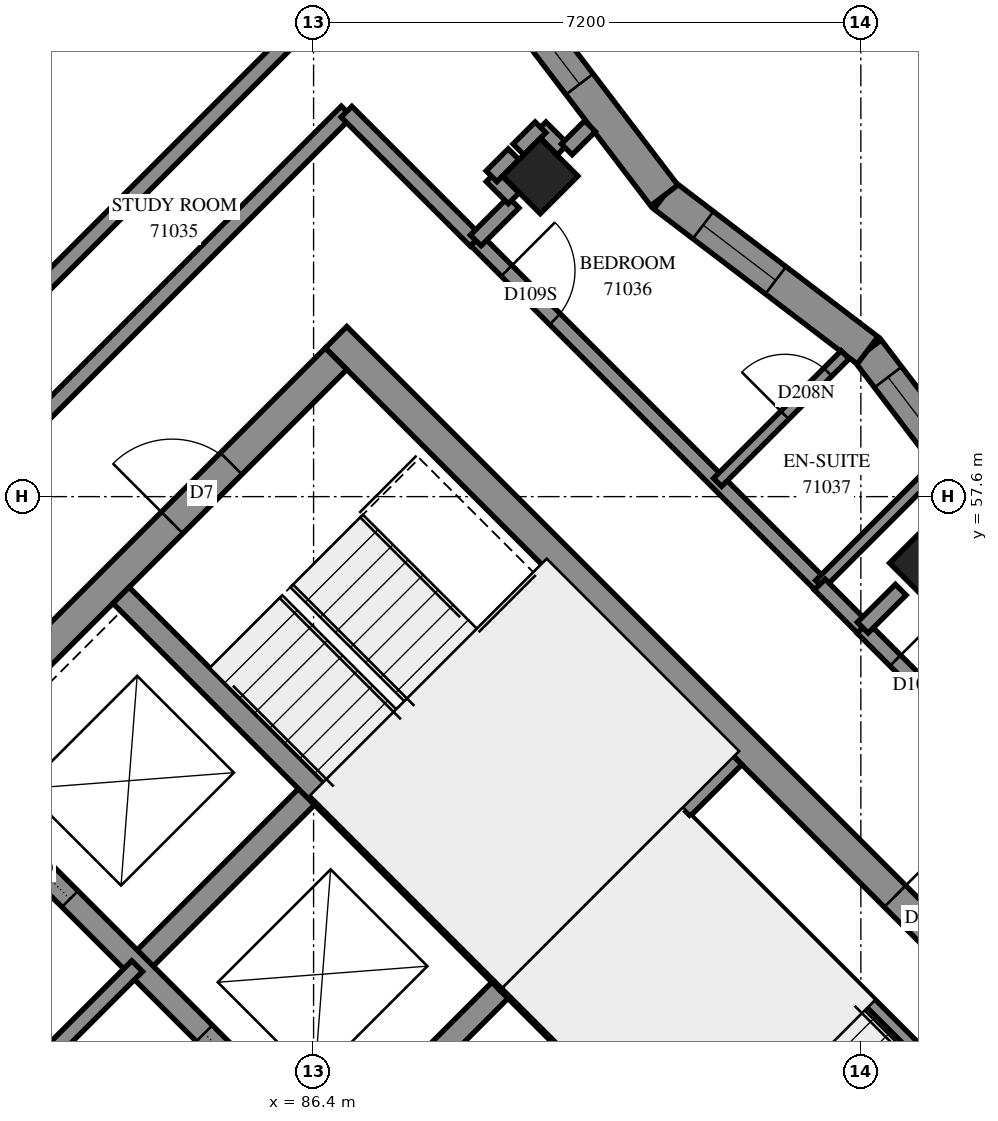
"""IFC4 building model, lengths in metres.
Left out: names, types, materials, properties, quantities, classifications, styles, units other than length and angle.
Written with IfcOpenShell. Run it as: python <this file> out.ifc"""

import sys

from ifc_helpers import new_model, si_unit, direction, frame, frame_2d, origin, origin_2d, place, context, subcontext, project, spatial, polyline, rectangle, outline, extrude, element, fill, save


model = new_model("IFC4")
c1 = context("Model", 3, precision=1e-05, world=origin(), true_north=direction((0.0, 1.0)))
c2 = subcontext(c1, "Body", "Model", "MODEL_VIEW")
j1 = project(units=[si_unit("LENGTHUNIT", "METRE"), si_unit("PLANEANGLEUNIT", "RADIAN")], contexts=[c1])
p1 = place(None, origin())
s1 = spatial("IfcSite", under=j1, at=p1, CompositionType="ELEMENT")
p2 = place(p1, origin())
s2 = spatial("IfcBuilding", under=s1, at=p2, CompositionType="ELEMENT")
p3 = place(p2, frame((0.0, 0.0, 260.8)))
s3 = spatial("IfcBuildingStorey", under=s2, at=p3, CompositionType="ELEMENT", Elevation=260.8)
for number, where, z_axis, x_axis in (
    (1, (89.382, 61.818, 0.0), (0.0, 0.0, 1.0), (0.707, -0.707, 0.0)),
    (2, (94.474, 56.727, 0.0), (0.0, 0.0, 1.0), (0.707, -0.707, 0.0)),
):
    element("IfcColumn", number, at=place(p3, frame(where, z_axis=z_axis, x_axis=x_axis)), inside=s3, PredefinedType="COLUMN", context=c2, shape_type="SweptSolid", body=[
        extrude(rectangle(XDim=0.7, YDim=0.7, at=origin_2d()), origin(), (0.0, 0.0, 1.0), 3.1),
    ])
p4 = place(p3, frame((86.695, 59.696, -0.3), z_axis=(0.0, 0.0, 1.0), x_axis=(0.7071100706, -0.7071034917, 0.0)))
e3 = element("IfcWall", 3, at=p4, inside=s3, PredefinedType="SHEAR", context=c2, shape_type="SweptSolid", body=[
    extrude(rectangle(XDim=15.2, YDim=0.4, at=frame_2d((7.6, 0.0))), origin(), (0.0, 0.0, 1.0), 2.7),
])
p5 = place(p4, frame((10.4, 0.0, 0.3)))
e4 = element("IfcOpeningElement", 4, at=p5, cuts=e3, PredefinedType="OPENING", context=c2, shape_type="SweptSolid", body=[
    extrude(rectangle(XDim=0.8, YDim=2.1, at=frame_2d((0.4, 1.05))), frame((0.0, 0.21, 0.0), z_axis=(0.0, -1.0, 0.0), x_axis=(1.0, 0.0, 0.0)), (0.0, 0.0, 1.0), 0.42),
])
p6 = place(p3, frame((76.513, 49.231, -0.3), z_axis=(0.0, 0.0, 1.0), x_axis=(0.7071067812, 0.7071067812, 0.0)))
e5 = element("IfcWall", 5, at=p6, inside=s3, PredefinedType="SHEAR", context=c2, shape_type="SweptSolid", body=[
    extrude(rectangle(XDim=14.4, YDim=0.4, at=frame_2d((7.2, 0.0))), origin(), (0.0, 0.0, 1.0), 2.7),
])
p7 = place(p6, frame((4.55, 0.0, 0.3)))
e6 = element("IfcOpeningElement", 6, at=p7, cuts=e5, PredefinedType="OPENING", context=c2, shape_type="SweptSolid", body=[
    extrude(rectangle(XDim=1.1, YDim=2.1, at=frame_2d((0.55, 1.05))), frame((0.0, 0.21, 0.0), z_axis=(0.0, -1.0, 0.0), x_axis=(1.0, 0.0, 0.0)), (0.0, 0.0, 1.0), 0.42),
])
p8 = place(p6, frame((11.35, 0.0, 0.3)))
e7 = element("IfcOpeningElement", 7, at=p8, cuts=e5, PredefinedType="OPENING", context=c2, shape_type="SweptSolid", body=[
    extrude(rectangle(XDim=1.1, YDim=2.1, at=frame_2d((0.55, 1.05))), frame((0.0, 0.21, 0.0), z_axis=(0.0, -1.0, 0.0), x_axis=(1.0, 0.0, 0.0)), (0.0, 0.0, 1.0), 0.42),
])
p9 = place(p3, frame((84.079, 51.423, 0.0), z_axis=(0.0, 0.0, 1.0), x_axis=(0.7071219326, 0.7070916295, 0.0)))
e8 = element("IfcWall", 8, at=p9, inside=s3, PredefinedType="SOLIDWALL", context=c2, shape_type="SweptSolid", body=[
    extrude(rectangle(XDim=3.3, YDim=0.3, at=frame_2d((1.65, 0.0))), origin(), (0.0, 0.0, 1.0), 3.1),
])
p10 = place(p3, frame((86.625, 48.878, 0.0), z_axis=(0.0, 0.0, 1.0), x_axis=(0.7071067812, 0.7071067812, 0.0)))
e9 = element("IfcWall", 9, at=p10, inside=s3, PredefinedType="SOLIDWALL", context=c2, shape_type="SweptSolid", body=[
    extrude(rectangle(XDim=3.3, YDim=0.3, at=frame_2d((1.65, 0.0))), origin(), (0.0, 0.0, 1.0), 3.1),
])
p11 = place(p3, frame((78.988, 51.423, 0.0), z_axis=(0.0, 0.0, 1.0), x_axis=(0.7071067812, -0.7071067812, 0.0)))
e10 = element("IfcWall", 10, at=p11, inside=s3, PredefinedType="SOLIDWALL", context=c2, shape_type="SweptSolid", body=[
    extrude(rectangle(XDim=14.4, YDim=0.3, at=frame_2d((7.2, 0.0))), origin(), (0.0, 0.0, 1.0), 3.1),
])
p12 = place(p11, frame((1.35, 0.0, 0.0)))
e11 = element("IfcOpeningElement", 11, at=p12, cuts=e10, PredefinedType="OPENING", context=c2, shape_type="SweptSolid", body=[
    extrude(rectangle(XDim=0.9, YDim=2.1, at=frame_2d((0.45, 1.05))), frame((0.0, 0.16, 0.0), z_axis=(0.0, -1.0, 0.0), x_axis=(1.0, 0.0, 0.0)), (0.0, 0.0, 1.0), 0.32),
])
p13 = place(p11, frame((4.95, 0.0, 0.0)))
e12 = element("IfcOpeningElement", 12, at=p13, cuts=e10, PredefinedType="OPENING", context=c2, shape_type="SweptSolid", body=[
    extrude(rectangle(XDim=0.9, YDim=2.1, at=frame_2d((0.45, 1.05))), frame((0.0, 0.16, 0.0), z_axis=(0.0, -1.0, 0.0), x_axis=(1.0, 0.0, 0.0)), (0.0, 0.0, 1.0), 0.32),
])
p14 = place(p11, frame((8.55, 0.0, 0.0)))
e13 = element("IfcOpeningElement", 13, at=p14, cuts=e10, PredefinedType="OPENING", context=c2, shape_type="SweptSolid", body=[
    extrude(rectangle(XDim=0.9, YDim=2.1, at=frame_2d((0.45, 1.05))), frame((0.0, 0.16, 0.0), z_axis=(0.0, -1.0, 0.0), x_axis=(1.0, 0.0, 0.0)), (0.0, 0.0, 1.0), 0.32),
])
p15 = place(p11, frame((12.05, 0.0, 0.0)))
e14 = element("IfcOpeningElement", 14, at=p15, cuts=e10, PredefinedType="OPENING", context=c2, shape_type="SweptSolid", body=[
    extrude(rectangle(XDim=1.1, YDim=2.1, at=frame_2d((0.55, 1.05))), frame((0.0, 0.16, 0.0), z_axis=(0.0, -1.0, 0.0), x_axis=(1.0, 0.0, 0.0)), (0.0, 0.0, 1.0), 0.32),
])
p16 = place(p3, frame((81.534, 53.969, 0.0), z_axis=(0.0, 0.0, 1.0), x_axis=(0.707103309, -0.7071102534, 0.0)))
e15 = element("IfcWall", 15, at=p16, inside=s3, PredefinedType="SOLIDWALL", context=c2, shape_type="SweptSolid", body=[
    extrude(rectangle(XDim=14.4, YDim=0.3, at=frame_2d((7.2, 0.0))), origin(), (0.0, 0.0, 1.0), 3.1),
])
p17 = place(p16, frame((8.55, 0.0, 0.0)))
e16 = element("IfcOpeningElement", 16, at=p17, cuts=e15, PredefinedType="OPENING", context=c2, shape_type="SweptSolid", body=[
    extrude(rectangle(XDim=0.9, YDim=2.1, at=frame_2d((0.45, 1.05))), frame((0.0, 0.16, 0.0), z_axis=(0.0, -1.0, 0.0), x_axis=(1.0, 0.0, 0.0)), (0.0, 0.0, 1.0), 0.32),
])
p18 = place(p16, frame((1.25, 0.0, 0.0)))
e17 = element("IfcOpeningElement", 17, at=p18, cuts=e15, PredefinedType="OPENING", context=c2, shape_type="SweptSolid", body=[
    extrude(rectangle(XDim=1.1, YDim=2.1, at=frame_2d((0.55, 1.05))), frame((0.0, 0.16, 0.0), z_axis=(0.0, -1.0, 0.0), x_axis=(1.0, 0.0, 0.0)), (0.0, 0.0, 1.0), 0.32),
])
p19 = place(p16, frame((4.85, 0.0, 0.0)))
e18 = element("IfcOpeningElement", 18, at=p19, cuts=e15, PredefinedType="OPENING", context=c2, shape_type="SweptSolid", body=[
    extrude(rectangle(XDim=1.1, YDim=2.1, at=frame_2d((0.55, 1.05))), frame((0.0, 0.16, 0.0), z_axis=(0.0, -1.0, 0.0), x_axis=(1.0, 0.0, 0.0)), (0.0, 0.0, 1.0), 0.32),
])
p20 = place(p16, frame((12.05, 0.0, 0.0)))
e19 = element("IfcOpeningElement", 19, at=p20, cuts=e15, PredefinedType="OPENING", context=c2, shape_type="SweptSolid", body=[
    extrude(rectangle(XDim=1.1, YDim=2.1, at=frame_2d((0.55, 1.05))), frame((0.0, 0.16, 0.0), z_axis=(0.0, -1.0, 0.0), x_axis=(1.0, 0.0, 0.0)), (0.0, 0.0, 1.0), 0.32),
])
for number, where, z_axis, x_axis in (
    (20, (83.867, 56.302, 0.0), (0.0, 0.0, 1.0), (0.707, -0.707, 0.0)),
    (21, (88.958, 51.211, 0.0), (0.0, 0.0, 1.0), (0.707, -0.707, 0.0)),
):
    element("IfcWall", number, at=place(p3, frame(where, z_axis=z_axis, x_axis=x_axis)), inside=s3, PredefinedType="SOLIDWALL", context=c2, shape_type="SweptSolid", body=[
        extrude(rectangle(XDim=7.2, YDim=0.3, at=frame_2d((3.6, 0.0))), origin(), (0.0, 0.0, 1.0), 3.1),
    ])
p21 = place(p3, frame((88.958, 51.211, 0.0), z_axis=(0.0, 0.0, 1.0), x_axis=(0.7071067812, 0.7071067812, 0.0)))
e22 = element("IfcWall", 22, at=p21, inside=s3, PredefinedType="SOLIDWALL", context=c2, shape_type="SweptSolid", body=[
    extrude(rectangle(XDim=4.2, YDim=0.3, at=frame_2d((2.1, 0.0))), origin(), (0.0, 0.0, 1.0), 3.1),
])
p22 = place(p3, frame((95.727, 56.849, 0.0), z_axis=(0.0, 0.0, 1.0), x_axis=(-0.6059151193, 0.7955293007, 0.0)))
e23 = element("IfcWall", 23, at=p22, inside=s3, PredefinedType="SOLIDWALL", context=c2, shape_type="SweptSolid", body=[
    extrude(outline(polyline([(0.03, -0.225), (3.394, -0.225), (3.333, 0.225), (-0.03, 0.225), (0.03, -0.225)])), origin(), (0.0, 0.0, 1.0), 3.1),
])
p23 = place(p22, frame((1.72, 0.0, 0.45)))
e24 = element("IfcOpeningElement", 24, at=p23, cuts=e23, PredefinedType="OPENING", context=c2, shape_type="SweptSolid", body=[
    extrude(rectangle(XDim=1.2, YDim=2.55, at=frame_2d((0.6, 1.275))), frame((0.0, 0.235, 0.0), z_axis=(0.0, -1.0, 0.0), x_axis=(1.0, 0.0, 0.0)), (0.0, 0.0, 1.0), 0.47),
])
p24 = place(p3, frame((93.689, 59.525, 0.0), z_axis=(0.0, 0.0, 1.0), x_axis=(-0.7955327164, 0.6059106346, 0.0)))
e25 = element("IfcWall", 25, at=p24, inside=s3, PredefinedType="SOLIDWALL", context=c2, shape_type="SweptSolid", body=[
    extrude(outline(polyline([(-0.03, -0.225), (3.333, -0.225), (3.394, 0.225), (0.03, 0.225), (-0.03, -0.225)])), origin(), (0.0, 0.0, 1.0), 3.1),
])
p25 = place(p24, frame((1.52, 0.0, 0.45)))
e26 = element("IfcOpeningElement", 26, at=p25, cuts=e25, PredefinedType="OPENING", context=c2, shape_type="SweptSolid", body=[
    extrude(rectangle(XDim=1.2, YDim=2.55, at=frame_2d((0.6, 1.275))), frame((0.0, 0.235, 0.0), z_axis=(0.0, -1.0, 0.0), x_axis=(1.0, 0.0, 0.0)), (0.0, 0.0, 1.0), 0.47),
])
p26 = place(p3, frame((91.013, 61.562, 0.0), z_axis=(0.0, 0.0, 1.0), x_axis=(-0.6059151193, 0.7955293007, 0.0)))
e27 = element("IfcWall", 27, at=p26, inside=s3, PredefinedType="SOLIDWALL", context=c2, shape_type="SweptSolid", body=[
    extrude(outline(polyline([(0.03, -0.225), (3.394, -0.225), (3.333, 0.225), (-0.03, 0.225), (0.03, -0.225)])), origin(), (0.0, 0.0, 1.0), 3.1),
])
p27 = place(p26, frame((1.84, 0.0, 0.45)))
e28 = element("IfcOpeningElement", 28, at=p27, cuts=e27, PredefinedType="OPENING", context=c2, shape_type="SweptSolid", body=[
    extrude(rectangle(XDim=1.2, YDim=2.55, at=frame_2d((0.6, 1.275))), frame((0.0, 0.235, 0.0), z_axis=(0.0, -1.0, 0.0), x_axis=(1.0, 0.0, 0.0)), (0.0, 0.0, 1.0), 0.47),
])
p28 = place(p3, frame((91.313, 53.354, 0.0), z_axis=(0.0, 0.0, 1.0), x_axis=(0.7071140275, -0.7070995348, 0.0)))
e29 = element("IfcWall", 29, at=p28, inside=s3, PredefinedType="PARTITIONING", context=c2, shape_type="SweptSolid", body=[
    extrude(rectangle(XDim=6.9, YDim=0.15, at=frame_2d((3.45, 0.0))), origin(), (0.0, 0.0, 1.0), 3.1),
])
p29 = place(p3, frame((81.534, 48.878, 0.0), z_axis=(0.0, 0.0, 1.0), x_axis=(0.707092892, 0.7071206701, 0.0)))
e30 = element("IfcWall", 30, at=p29, inside=s3, PredefinedType="PARTITIONING", context=c2, shape_type="SweptSolid", body=[
    extrude(rectangle(XDim=3.6, YDim=0.2, at=frame_2d((1.8, 0.0))), origin(), (0.0, 0.0, 1.0), 3.1),
])
p30 = place(p3, frame((81.179, 58.707, 0.0), z_axis=(0.0, 0.0, 1.0), x_axis=(0.7071067812, 0.7071067812, 0.0)))
e31 = element("IfcWall", 31, at=p30, inside=s3, PredefinedType="PARTITIONING", context=c2, shape_type="SweptSolid", body=[
    extrude(rectangle(XDim=8.98, YDim=0.2, at=frame_2d((4.49, 0.0))), origin(), (0.0, 0.0, 1.0), 3.1),
])
p31 = place(p3, frame((82.028, 57.858, 0.0), z_axis=(0.0, 0.0, 1.0), x_axis=(0.7071067812, 0.7071067812, 0.0)))
e32 = element("IfcWall", 32, at=p31, inside=s3, PredefinedType="PARTITIONING", context=c2, shape_type="SweptSolid", body=[
    extrude(rectangle(XDim=6.8, YDim=0.2, at=frame_2d((3.4, 0.0))), origin(), (0.0, 0.0, 1.0), 3.1),
])
p32 = place(p31, frame((0.211, 0.0, 0.0)))
e33 = element("IfcOpeningElement", 33, at=p32, cuts=e32, PredefinedType="OPENING", context=c2, shape_type="SweptSolid", body=[
    extrude(rectangle(XDim=1.0, YDim=2.1, at=frame_2d((0.5, 1.05))), frame((0.0, 0.11, 0.0), z_axis=(0.0, -1.0, 0.0), x_axis=(1.0, 0.0, 0.0)), (0.0, 0.0, 1.0), 0.22),
])
p33 = place(p3, frame((88.537, 60.973, 0.0), z_axis=(0.0, 0.0, 1.0), x_axis=(0.7071067812, -0.7071067812, 0.0)))
e34 = element("IfcWall", 34, at=p33, inside=s3, PredefinedType="PARTITIONING", context=c2, shape_type="SweptSolid", body=[
    extrude(rectangle(XDim=6.401, YDim=0.2, at=frame_2d((3.2, 0.0))), origin(), (0.0, 0.0, 1.0), 3.1),
])
p34 = place(p33, frame((0.569, 0.0, 0.0)))
e35 = element("IfcOpeningElement", 35, at=p34, cuts=e34, PredefinedType="OPENING", context=c2, shape_type="SweptSolid", body=[
    extrude(rectangle(XDim=0.9, YDim=2.1, at=frame_2d((0.45, 1.05))), frame((0.0, 0.11, 0.0), z_axis=(0.0, -1.0, 0.0), x_axis=(1.0, 0.0, 0.0)), (0.0, 0.0, 1.0), 0.22),
])
p35 = place(p3, frame((93.621, 55.875, 0.0), z_axis=(0.0, 0.0, 1.0), x_axis=(0.7071623255, -0.7070512325, 0.0)))
e36 = element("IfcWall", 36, at=p35, inside=s3, PredefinedType="PARTITIONING", context=c2, shape_type="SweptSolid", body=[
    extrude(rectangle(XDim=5.401, YDim=0.2, at=frame_2d((2.7, 0.0))), origin(), (0.0, 0.0, 1.0), 3.1),
])
p36 = place(p35, frame((0.611, 0.0, 0.0)))
e37 = element("IfcOpeningElement", 37, at=p36, cuts=e36, PredefinedType="OPENING", context=c2, shape_type="SweptSolid", body=[
    extrude(rectangle(XDim=0.9, YDim=2.1, at=frame_2d((0.45, 1.05))), frame((0.0, 0.11, 0.0), z_axis=(0.0, -1.0, 0.0), x_axis=(1.0, 0.0, 0.0)), (0.0, 0.0, 1.0), 0.22),
])
p37 = place(p3, frame((86.833, 62.663, 0.0), z_axis=(0.0, 0.0, 1.0), x_axis=(0.7075233388, -0.706689978, 0.0)))
e38 = element("IfcWall", 38, at=p37, inside=s3, PredefinedType="PARTITIONING", context=c2, shape_type="SweptSolid", body=[
    extrude(rectangle(XDim=2.4, YDim=0.2, at=frame_2d((1.2, 0.0))), origin(), (0.0, 0.0, 1.0), 3.1),
])
p38 = place(p3, frame((91.716, 57.788, 0.0), z_axis=(0.0, 0.0, 1.0), x_axis=(0.7071067812, 0.7071067812, 0.0)))
e39 = element("IfcWall", 39, at=p38, inside=s3, PredefinedType="PARTITIONING", context=c2, shape_type="SweptSolid", body=[
    extrude(rectangle(XDim=2.373, YDim=0.15, at=frame_2d((1.187, 0.0))), origin(), (0.0, 0.0, 1.0), 3.1),
])
p39 = place(p38, frame((1.25, 0.0, 0.0)))
e40 = element("IfcOpeningElement", 40, at=p39, cuts=e39, PredefinedType="OPENING", context=c2, shape_type="SweptSolid", body=[
    extrude(rectangle(XDim=0.8, YDim=2.1, at=frame_2d((0.4, 1.05))), frame((0.0, 0.085, 0.0), z_axis=(0.0, -1.0, 0.0), x_axis=(1.0, 0.0, 0.0)), (0.0, 0.0, 1.0), 0.17),
])
p40 = place(p3, frame((93.059, 56.445, 0.0), z_axis=(0.0, 0.0, 1.0), x_axis=(0.7071067812, 0.7071067812, 0.0)))
e41 = element("IfcWall", 41, at=p40, inside=s3, PredefinedType="PARTITIONING", context=c2, shape_type="SweptSolid", body=[
    extrude(rectangle(XDim=2.162, YDim=0.15, at=frame_2d((1.081, 0.0))), origin(), (0.0, 0.0, 1.0), 3.1),
])
p41 = place(p3, frame((93.059, 56.443, 0.0), z_axis=(0.0, 0.0, 1.0), x_axis=(0.7058541592, -0.7083571881, 0.0)))
e42 = element("IfcWall", 42, at=p41, inside=s3, PredefinedType="PARTITIONING", context=c2, shape_type="SweptSolid", body=[
    extrude(rectangle(XDim=0.799, YDim=0.2, at=frame_2d((0.4, 0.0))), origin(), (0.0, 0.0, 1.0), 3.1),
])
p42 = place(p3, frame((93.625, 55.877, 0.0), z_axis=(0.0, 0.0, 1.0), x_axis=(0.7085224061, 0.7056883165, 0.0)))
e43 = element("IfcWall", 43, at=p42, inside=s3, PredefinedType="PARTITIONING", context=c2, shape_type="SweptSolid", body=[
    extrude(rectangle(XDim=0.706, YDim=0.2, at=frame_2d((0.353, 0.0))), origin(), (0.0, 0.0, 1.0), 3.1),
])
p43 = place(p3, frame((88.534, 60.971, 0.0), z_axis=(0.0, 0.0, 1.0), x_axis=(0.7071067812, 0.7071067812, 0.0)))
e44 = element("IfcWall", 44, at=p43, inside=s3, PredefinedType="PARTITIONING", context=c2, shape_type="SweptSolid", body=[
    extrude(rectangle(XDim=0.704, YDim=0.2, at=frame_2d((0.352, 0.0))), origin(), (0.0, 0.0, 1.0), 3.1),
])
for number, where, z_axis, x_axis in (
    (45, (88.743, 61.815, 0.0), (0.0, 0.0, 1.0), (0.707, -0.707, 0.0)),
    (46, (89.386, 62.458, 0.0), (0.0, 0.0, 1.0), (0.707, -0.707, 0.0)),
    (47, (88.741, 61.815, 0.0), (0.0, 0.0, 1.0), (0.707, 0.707, 0.0)),
    (48, (89.095, 62.169, 0.0), (0.0, 0.0, 1.0), (0.707, 0.707, 0.0)),
):
    element("IfcWall", number, at=place(p3, frame(where, z_axis=z_axis, x_axis=x_axis)), inside=s3, PredefinedType="PARTITIONING", context=c2, shape_type="SweptSolid", body=[
        extrude(rectangle(XDim=0.41, YDim=0.2, at=frame_2d((0.205, 0.0))), origin(), (0.0, 0.0, 1.0), 3.1),
    ])
p44 = place(p3, frame((89.731, 62.169, 0.0), z_axis=(0.0, 0.0, 1.0), x_axis=(0.7071067812, 0.7071067812, 0.0)))
e49 = element("IfcWall", 49, at=p44, inside=s3, PredefinedType="PARTITIONING", context=c2, shape_type="SweptSolid", body=[
    extrude(rectangle(XDim=0.432, YDim=0.2, at=frame_2d((0.216, 0.0))), origin(), (0.0, 0.0, 1.0), 3.1),
])
p45 = place(p23, origin())
e50 = element("IfcWindow", 50, at=p45, inside=s3, PartitioningType="SINGLE_PANEL", PredefinedType="WINDOW", context=c2, shape_type="SweptSolid", body=[
    extrude(rectangle(XDim=1.2, YDim=2.55, at=frame_2d((0.6, 1.275))), frame((0.0, 0.205, 0.0), z_axis=(0.0, -1.0, 0.0), x_axis=(1.0, 0.0, 0.0)), (0.0, 0.0, 1.0), 0.06),
])
fill(e24, e50)
p46 = place(p25, origin())
e51 = element("IfcWindow", 51, at=p46, inside=s3, PartitioningType="SINGLE_PANEL", PredefinedType="WINDOW", context=c2, shape_type="SweptSolid", body=[
    extrude(rectangle(XDim=1.2, YDim=2.55, at=frame_2d((0.6, 1.275))), frame((0.0, 0.205, 0.0), z_axis=(0.0, -1.0, 0.0), x_axis=(1.0, 0.0, 0.0)), (0.0, 0.0, 1.0), 0.06),
])
fill(e26, e51)
p47 = place(p27, origin())
e52 = element("IfcWindow", 52, at=p47, inside=s3, PartitioningType="SINGLE_PANEL", PredefinedType="WINDOW", context=c2, shape_type="SweptSolid", body=[
    extrude(rectangle(XDim=1.2, YDim=2.55, at=frame_2d((0.6, 1.275))), frame((0.0, 0.205, 0.0), z_axis=(0.0, -1.0, 0.0), x_axis=(1.0, 0.0, 0.0)), (0.0, 0.0, 1.0), 0.06),
])
fill(e28, e52)
p48 = place(p5, origin())
e53 = element("IfcDoor", 53, at=p48, inside=s3, OperationType="SINGLE_SWING_RIGHT", PredefinedType="DOOR", context=c2, shape_type="SweptSolid", body=[
    extrude(rectangle(XDim=0.8, YDim=2.1, at=frame_2d((0.4, 1.05))), frame((0.0, 0.025, 0.0), z_axis=(0.0, -1.0, 0.0), x_axis=(1.0, 0.0, 0.0)), (0.0, 0.0, 1.0), 0.05),
])
fill(e4, e53)
p49 = place(p8, origin())
e54 = element("IfcDoor", 54, at=p49, inside=s3, OperationType="SINGLE_SWING_LEFT", PredefinedType="DOOR", context=c2, shape_type="SweptSolid", body=[
    extrude(rectangle(XDim=1.1, YDim=2.1, at=frame_2d((0.55, 1.05))), frame((0.0, 0.025, 0.0), z_axis=(0.0, -1.0, 0.0), x_axis=(1.0, 0.0, 0.0)), (0.0, 0.0, 1.0), 0.05),
])
fill(e7, e54)
p50 = place(p18, origin())
e55 = element("IfcDoor", 55, at=p50, inside=s3, OperationType="SLIDING_TO_LEFT", PredefinedType="DOOR", context=c2, shape_type="SweptSolid", body=[
    extrude(rectangle(XDim=1.1, YDim=2.1, at=frame_2d((0.55, 1.05))), frame((0.0, 0.025, 0.0), z_axis=(0.0, -1.0, 0.0), x_axis=(1.0, 0.0, 0.0)), (0.0, 0.0, 1.0), 0.05),
])
fill(e17, e55)
p51 = place(p19, origin())
e56 = element("IfcDoor", 56, at=p51, inside=s3, OperationType="SLIDING_TO_RIGHT", PredefinedType="DOOR", context=c2, shape_type="SweptSolid", body=[
    extrude(rectangle(XDim=1.1, YDim=2.1, at=frame_2d((0.55, 1.05))), frame((0.0, 0.025, 0.0), z_axis=(0.0, -1.0, 0.0), x_axis=(1.0, 0.0, 0.0)), (0.0, 0.0, 1.0), 0.05),
])
fill(e18, e56)
p52 = place(p34, origin())
e57 = element("IfcDoor", 57, at=p52, inside=s3, OperationType="SINGLE_SWING_LEFT", PredefinedType="DOOR", context=c2, shape_type="SweptSolid", body=[
    extrude(rectangle(XDim=0.9, YDim=2.1, at=frame_2d((0.45, 1.05))), frame((0.0, 0.025, 0.0), z_axis=(0.0, -1.0, 0.0), x_axis=(1.0, 0.0, 0.0)), (0.0, 0.0, 1.0), 0.05),
])
fill(e35, e57)
p53 = place(p39, origin())
e58 = element("IfcDoor", 58, at=p53, inside=s3, OperationType="SINGLE_SWING_RIGHT", PredefinedType="DOOR", context=c2, shape_type="SweptSolid", body=[
    extrude(rectangle(XDim=0.8, YDim=2.1, at=frame_2d((0.4, 1.05))), frame((0.0, 0.025, 0.0), z_axis=(0.0, -1.0, 0.0), x_axis=(1.0, 0.0, 0.0)), (0.0, 0.0, 1.0), 0.05),
])
fill(e40, e58)
p54 = place(p36, origin())
e59 = element("IfcDoor", 59, at=p54, inside=s3, OperationType="SINGLE_SWING_LEFT", PredefinedType="DOOR", context=c2, shape_type="SweptSolid", body=[
    extrude(rectangle(XDim=0.9, YDim=2.1, at=frame_2d((0.45, 1.05))), frame((0.0, 0.025, 0.0), z_axis=(0.0, -1.0, 0.0), x_axis=(1.0, 0.0, 0.0)), (0.0, 0.0, 1.0), 0.05),
])
fill(e37, e59)
save(model, sys.argv[1])
